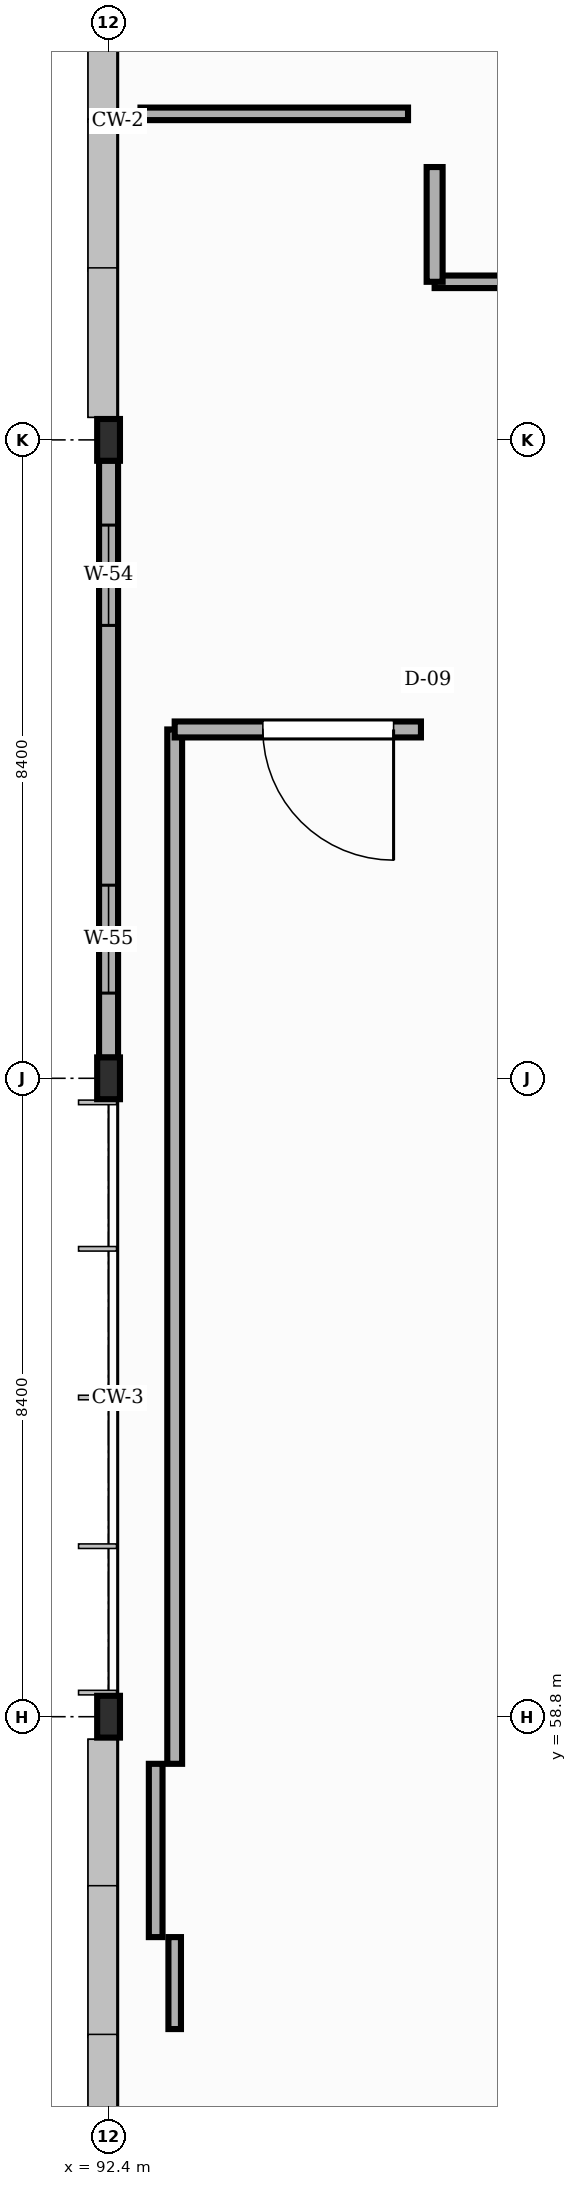
"""IFC4 building model, lengths in metres.
Left out: names, types, materials, properties, quantities, classifications, styles, units other than length and angle.
Written with IfcOpenShell. Run it as: python <this file> out.ifc"""

import sys

from ifc_helpers import new_model, si_unit, direction, frame, frame_2d, origin, origin_2d, place, context, subcontext, project, spatial, rectangle, i_section, extrude, element, fill, save


model = new_model("IFC4")
c1 = context("Model", 3, precision=1e-05, world=origin(), true_north=direction((0.0, 1.0)))
c2 = subcontext(c1, "Body", "Model", "MODEL_VIEW")
j1 = project(units=[si_unit("LENGTHUNIT", "METRE"), si_unit("PLANEANGLEUNIT", "RADIAN")], contexts=[c1])
p1 = place(None, origin())
s1 = spatial("IfcSite", under=j1, at=p1, CompositionType="ELEMENT")
p2 = place(p1, origin())
s2 = spatial("IfcBuilding", under=s1, at=p2, CompositionType="ELEMENT")
p3 = place(p2, frame((0.0, 0.0, 9.9)))
s3 = spatial("IfcBuildingStorey", under=s2, at=p3, CompositionType="ELEMENT", Elevation=9.9)
for number, where, z_axis, x_axis in (
    (1, (92.4, 58.8, 0.0), (0.0, 0.0, 1.0), (1.0, 0.0, 0.0)),
    (2, (92.4, 67.2, 0.0), (0.0, 0.0, 1.0), (1.0, 0.0, 0.0)),
    (3, (92.4, 75.6, 0.0), (0.0, 0.0, 1.0), (1.0, 0.0, 0.0)),
):
    element("IfcColumn", number, at=place(p3, frame(where, z_axis=z_axis, x_axis=x_axis)), inside=s3, PredefinedType="COLUMN", context=c2, shape_type="SweptSolid", body=[
        extrude(i_section(OverallWidth=0.3, OverallDepth=0.55, WebThickness=0.015, FlangeThickness=0.029, FilletRadius=0.027, at=origin_2d()), origin(), (0.0, 0.0, 1.0), 4.05),
    ])
p4 = place(p3, frame((92.4, 75.329, 0.0), z_axis=(0.0, 0.0, 1.0), x_axis=(0.0, -1.0, 0.0)))
e4 = element("IfcWall", 4, at=p4, inside=s3, PredefinedType="STANDARD", context=c2, shape_type="SweptSolid", body=[
    extrude(rectangle(XDim=7.858, YDim=0.25, at=frame_2d((3.929, 0.0))), origin(), (0.0, 0.0, 1.0), 3.562),
])
p5 = place(p4, frame((0.85, 0.0, 0.9)))
e5 = element("IfcOpeningElement", 5, at=p5, cuts=e4, PredefinedType="OPENING", context=c2, shape_type="SweptSolid", body=[
    extrude(rectangle(XDim=1.32, YDim=2.05, at=frame_2d((0.66, 1.025))), frame((0.0, 0.135, 0.0), z_axis=(0.0, -1.0, 0.0), x_axis=(1.0, 0.0, 0.0)), (0.0, 0.0, 1.0), 0.27),
])
p6 = place(p4, frame((5.588, 0.0, 0.9)))
e6 = element("IfcOpeningElement", 6, at=p6, cuts=e4, PredefinedType="OPENING", context=c2, shape_type="SweptSolid", body=[
    extrude(rectangle(XDim=1.42, YDim=2.05, at=frame_2d((0.71, 1.025))), frame((0.0, 0.135, 0.0), z_axis=(0.0, -1.0, 0.0), x_axis=(1.0, 0.0, 0.0)), (0.0, 0.0, 1.0), 0.27),
])
p7 = place(p3, frame((96.34, 79.89, -0.004), z_axis=(0.0, 0.0, 1.0), x_axis=(-1.0, 0.0, 0.0)))
e7 = element("IfcWall", 7, at=p7, inside=s3, PredefinedType="STANDARD", context=c2, shape_type="SweptSolid", body=[
    extrude(rectangle(XDim=3.52, YDim=0.165, at=frame_2d((1.76, 0.0))), origin(), (0.0, 0.0, 1.0), 3.844),
])
p8 = place(p3, frame((101.13, 77.68, -0.004), z_axis=(0.0, 0.0, 1.0), x_axis=(-1.0, 0.0, 0.0)))
e8 = element("IfcWall", 8, at=p8, inside=s3, PredefinedType="STANDARD", context=c2, shape_type="SweptSolid", body=[
    extrude(rectangle(XDim=4.44, YDim=0.165, at=frame_2d((2.22, 0.0))), origin(), (0.0, 0.0, 1.0), 3.844),
])
p9 = place(p3, frame((96.69, 77.68, -0.004), z_axis=(0.0, 0.0, 1.0), x_axis=(0.0, 1.0, 0.0)))
e9 = element("IfcWall", 9, at=p9, inside=s3, PredefinedType="STANDARD", context=c2, shape_type="SweptSolid", body=[
    extrude(rectangle(XDim=1.51, YDim=0.21, at=frame_2d((0.755, 0.0))), origin(), (0.0, 0.0, 1.0), 3.844),
])
p10 = place(p3, frame((93.27, 71.79, -0.004), z_axis=(0.0, 0.0, 1.0), x_axis=(0.0, -1.0, 0.0)))
e10 = element("IfcWall", 10, at=p10, inside=s3, PredefinedType="STANDARD", context=c2, shape_type="SweptSolid", body=[
    extrude(rectangle(XDim=13.61, YDim=0.195, at=frame_2d((6.805, 0.0))), origin(), (0.0, 0.0, 1.0), 3.844),
])
p11 = place(p3, frame((93.02, 58.18, -0.004), z_axis=(0.0, 0.0, 1.0), x_axis=(0.0, -1.0, 0.0)))
e11 = element("IfcWall", 11, at=p11, inside=s3, PredefinedType="STANDARD", context=c2, shape_type="SweptSolid", body=[
    extrude(rectangle(XDim=2.28, YDim=0.18, at=frame_2d((1.14, 0.0))), origin(), (0.0, 0.0, 1.0), 3.844),
])
p12 = place(p3, frame((93.27, 55.9, -0.004), z_axis=(0.0, 0.0, 1.0), x_axis=(0.0, -1.0, 0.0)))
e12 = element("IfcWall", 12, at=p12, inside=s3, PredefinedType="STANDARD", context=c2, shape_type="SweptSolid", body=[
    extrude(rectangle(XDim=1.21, YDim=0.165, at=frame_2d((0.605, 0.0))), origin(), (0.0, 0.0, 1.0), 3.844),
])
p13 = place(p3, frame((96.51, 71.79, -0.004), z_axis=(0.0, 0.0, 1.0), x_axis=(-1.0, 0.0, 0.0)))
e13 = element("IfcWall", 13, at=p13, inside=s3, PredefinedType="STANDARD", context=c2, shape_type="SweptSolid", body=[
    extrude(rectangle(XDim=3.24, YDim=0.21, at=frame_2d((1.62, 0.0))), origin(), (0.0, 0.0, 1.0), 3.844),
])
p14 = place(p13, frame((0.36, 0.0, 0.0)))
e14 = element("IfcOpeningElement", 14, at=p14, cuts=e13, PredefinedType="OPENING", context=c2, shape_type="SweptSolid", body=[
    extrude(rectangle(XDim=1.72, YDim=2.06, at=frame_2d((0.86, 1.03))), frame((0.0, 0.115, 0.0), z_axis=(0.0, -1.0, 0.0), x_axis=(1.0, 0.0, 0.0)), (0.0, 0.0, 1.0), 0.23),
])
p15 = place(p5, origin())
e15 = element("IfcWindow", 15, at=p15, inside=s3, PartitioningType="SINGLE_PANEL", PredefinedType="WINDOW", context=c2, shape_type="SweptSolid", body=[
    extrude(rectangle(XDim=1.32, YDim=2.05, at=frame_2d((0.66, 1.025))), frame((0.0, 0.03, 0.0), z_axis=(0.0, -1.0, 0.0), x_axis=(1.0, 0.0, 0.0)), (0.0, 0.0, 1.0), 0.06),
])
fill(e5, e15)
p16 = place(p6, origin())
e16 = element("IfcWindow", 16, at=p16, inside=s3, PartitioningType="SINGLE_PANEL", PredefinedType="WINDOW", context=c2, shape_type="SweptSolid", body=[
    extrude(rectangle(XDim=1.42, YDim=2.05, at=frame_2d((0.71, 1.025))), frame((0.0, 0.03, 0.0), z_axis=(0.0, -1.0, 0.0), x_axis=(1.0, 0.0, 0.0)), (0.0, 0.0, 1.0), 0.06),
])
fill(e6, e16)
p17 = place(p14, origin())
e17 = element("IfcDoor", 17, at=p17, inside=s3, OperationType="SINGLE_SWING_LEFT", PredefinedType="DOOR", context=c2, shape_type="SweptSolid", body=[
    extrude(rectangle(XDim=1.72, YDim=2.06, at=frame_2d((0.86, 1.03))), frame((0.0, 0.025, 0.0), z_axis=(0.0, -1.0, 0.0), x_axis=(1.0, 0.0, 0.0)), (0.0, 0.0, 1.0), 0.05),
])
fill(e14, e17)
save(model, sys.argv[1])
